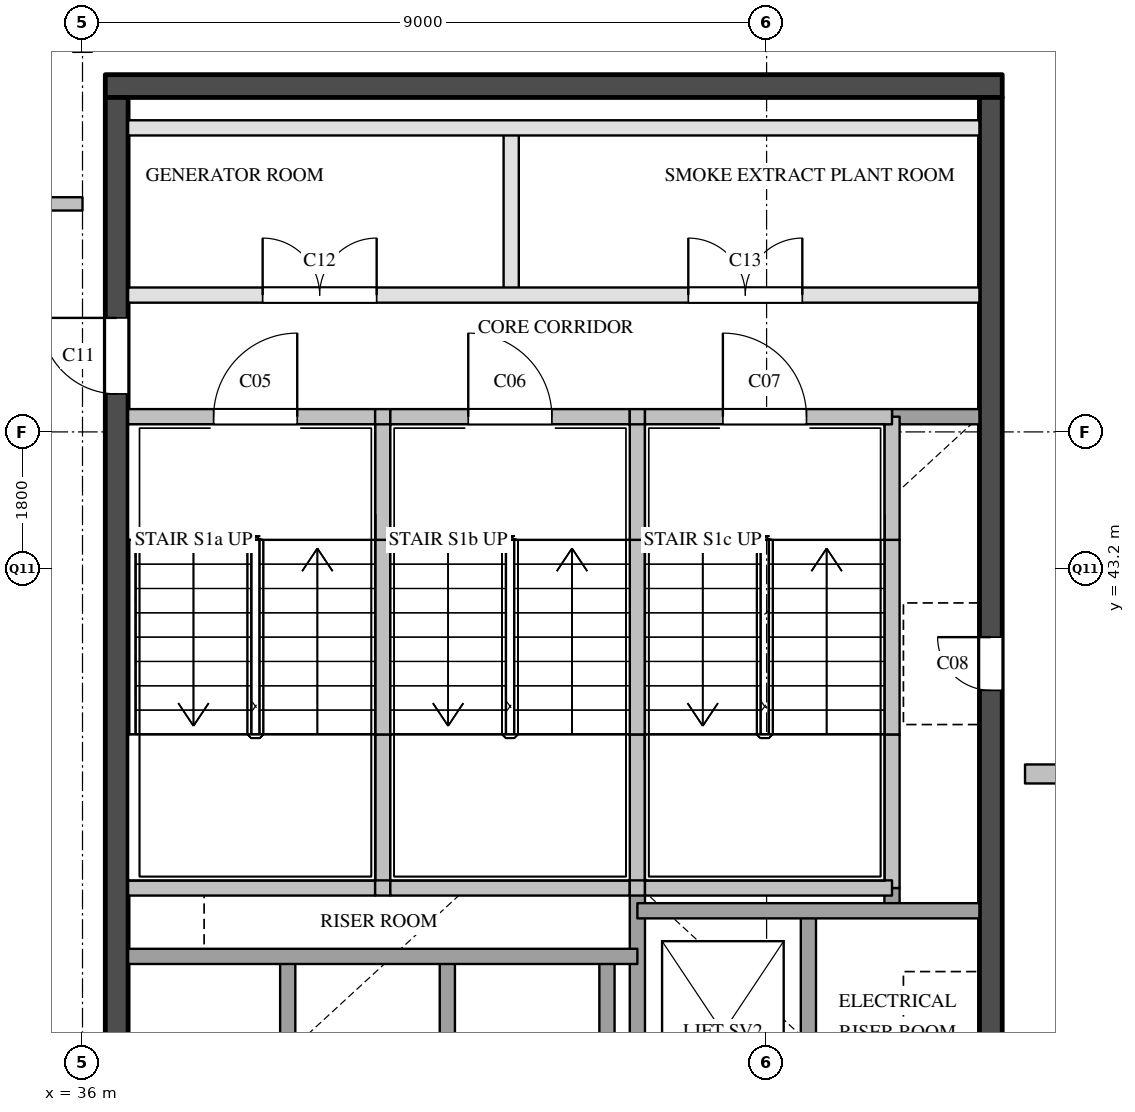
"""IFC4 building model, lengths in metres.
Left out: names, types, materials, properties, quantities, classifications, styles, units other than length and angle.
Written with IfcOpenShell. Run it as: python <this file> out.ifc"""

import sys

from ifc_helpers import new_model, si_unit, direction, frame, frame_2d, origin, place, context, subcontext, project, spatial, rectangle, extrude, element, fill, save


model = new_model("IFC4")
c1 = context("Model", 3, precision=1e-05, world=origin(), true_north=direction((0.0, 1.0)))
c2 = subcontext(c1, "Body", "Model", "MODEL_VIEW")
j1 = project(units=[si_unit("LENGTHUNIT", "METRE"), si_unit("PLANEANGLEUNIT", "RADIAN")], contexts=[c1])
p1 = place(None, origin())
s1 = spatial("IfcSite", under=j1, at=p1, CompositionType="ELEMENT")
p2 = place(p1, origin())
s2 = spatial("IfcBuilding", under=s1, at=p2, CompositionType="ELEMENT")
p3 = place(p2, frame((0.0, 0.0, 295.2)))
s3 = spatial("IfcBuildingStorey", under=s2, at=p3, CompositionType="ELEMENT", Elevation=295.2)
p4 = place(p3, frame((36.3, 49.55, 0.0), z_axis=(0.0, 0.0, 1.0), x_axis=(1.0, 0.0, 0.0)))
e1 = element("IfcWall", 1, at=p4, inside=s3, PredefinedType="SHEAR", context=c2, shape_type="SweptSolid", body=[
    extrude(rectangle(XDim=11.8, YDim=0.3, at=frame_2d((5.9, 0.0))), origin(), (0.0, 0.0, 1.0), 5.7),
])
p5 = place(p3, frame((36.45, 29.1, 0.0), z_axis=(0.0, 0.0, 1.0), x_axis=(0.0, 1.0, 0.0)))
e2 = element("IfcWall", 2, at=p5, inside=s3, PredefinedType="SHEAR", context=c2, shape_type="SweptSolid", body=[
    extrude(rectangle(XDim=20.3, YDim=0.3, at=frame_2d((10.15, 0.0))), origin(), (0.0, 0.0, 1.0), 5.7),
])
p6 = place(p5, frame((3.6, 0.0, 0.0)))
e3 = element("IfcOpeningElement", 3, at=p6, cuts=e2, PredefinedType="OPENING", context=c2, shape_type="SweptSolid", body=[
    extrude(rectangle(XDim=1.8, YDim=2.1, at=frame_2d((0.9, 1.05))), frame((0.0, 0.16, 0.0), z_axis=(0.0, -1.0, 0.0), x_axis=(1.0, 0.0, 0.0)), (0.0, 0.0, 1.0), 0.32),
])
p7 = place(p5, frame((16.4, 0.0, 0.0)))
e4 = element("IfcOpeningElement", 4, at=p7, cuts=e2, PredefinedType="OPENING", context=c2, shape_type="SweptSolid", body=[
    extrude(rectangle(XDim=1.0, YDim=2.1, at=frame_2d((0.5, 1.05))), frame((0.0, 0.16, 0.0), z_axis=(0.0, -1.0, 0.0), x_axis=(1.0, 0.0, 0.0)), (0.0, 0.0, 1.0), 0.32),
])
p8 = place(p3, frame((47.95, 29.1, 0.0), z_axis=(0.0, 0.0, 1.0), x_axis=(0.0, 1.0, 0.0)))
e5 = element("IfcWall", 5, at=p8, inside=s3, PredefinedType="SHEAR", context=c2, shape_type="SweptSolid", body=[
    extrude(rectangle(XDim=20.3, YDim=0.3, at=frame_2d((10.15, 0.0))), origin(), (0.0, 0.0, 1.0), 5.7),
])
p9 = place(p8, frame((12.5, 0.0, 0.0)))
e6 = element("IfcOpeningElement", 6, at=p9, cuts=e5, PredefinedType="OPENING", context=c2, shape_type="SweptSolid", body=[
    extrude(rectangle(XDim=0.7, YDim=2.1, at=frame_2d((0.35, 1.05))), frame((0.0, 0.16, 0.0), z_axis=(0.0, -1.0, 0.0), x_axis=(1.0, 0.0, 0.0)), (0.0, 0.0, 1.0), 0.32),
])
p10 = place(p3, frame((38.7, 34.9, 0.0), z_axis=(0.0, 0.0, 1.0), x_axis=(0.0, 1.0, 0.0)))
e7 = element("IfcWall", 7, at=p10, inside=s3, PredefinedType="SOLIDWALL", context=c2, shape_type="SweptSolid", body=[
    extrude(rectangle(XDim=3.2, YDim=0.2, at=frame_2d((1.6, 0.0))), origin(), (0.0, 0.0, 1.0), 5.7),
])
p11 = place(p3, frame((39.95, 39.0, 0.0), z_axis=(0.0, 0.0, 1.0), x_axis=(0.0, 1.0, 0.0)))
e8 = element("IfcWall", 8, at=p11, inside=s3, PredefinedType="SOLIDWALL", context=c2, shape_type="SweptSolid", body=[
    extrude(rectangle(XDim=2.02, YDim=0.2, at=frame_2d((1.01, 0.0))), origin(), (0.0, 0.0, 1.0), 5.7),
])
p12 = place(p3, frame((39.95, 41.02, 0.0), z_axis=(0.0, 0.0, 1.0), x_axis=(0.0, 1.0, 0.0)))
e9 = element("IfcWall", 9, at=p12, inside=s3, PredefinedType="SOLIDWALL", context=c2, shape_type="SweptSolid", body=[
    extrude(rectangle(XDim=2.56, YDim=0.2, at=frame_2d((1.28, 0.0))), origin(), (0.0, 0.0, 1.0), 5.7),
])
p13 = place(p3, frame((39.95, 43.58, 0.0), z_axis=(0.0, 0.0, 1.0), x_axis=(0.0, 1.0, 0.0)))
e10 = element("IfcWall", 10, at=p13, inside=s3, PredefinedType="SOLIDWALL", context=c2, shape_type="SweptSolid", body=[
    extrude(rectangle(XDim=1.62, YDim=0.2, at=frame_2d((0.81, 0.0))), origin(), (0.0, 0.0, 1.0), 5.7),
])
p14 = place(p3, frame((40.8, 34.9, 0.0), z_axis=(0.0, 0.0, 1.0), x_axis=(0.0, 1.0, 0.0)))
e11 = element("IfcWall", 11, at=p14, inside=s3, PredefinedType="SOLIDWALL", context=c2, shape_type="SweptSolid", body=[
    extrude(rectangle(XDim=3.2, YDim=0.2, at=frame_2d((1.6, 0.0))), origin(), (0.0, 0.0, 1.0), 5.7),
])
p15 = place(p3, frame((41.64, 46.8, 0.0), z_axis=(0.0, 0.0, 1.0), x_axis=(0.0, 1.0, 0.0)))
e12 = element("IfcWall", 12, at=p15, inside=s3, PredefinedType="PARTITIONING", context=c2, shape_type="SweptSolid", body=[
    extrude(rectangle(XDim=2.2, YDim=0.2, at=frame_2d((1.1, 0.0))), origin(), (0.0, 0.0, 1.0), 5.7),
])
p16 = place(p3, frame((42.9, 34.9, 0.0), z_axis=(0.0, 0.0, 1.0), x_axis=(0.0, 1.0, 0.0)))
e13 = element("IfcWall", 13, at=p16, inside=s3, PredefinedType="SOLIDWALL", context=c2, shape_type="SweptSolid", body=[
    extrude(rectangle(XDim=3.2, YDim=0.2, at=frame_2d((1.6, 0.0))), origin(), (0.0, 0.0, 1.0), 5.7),
])
p17 = place(p3, frame((43.3, 29.1, 0.0), z_axis=(0.0, 0.0, 1.0), x_axis=(0.0, 1.0, 0.0)))
e14 = element("IfcWall", 14, at=p17, inside=s3, PredefinedType="SOLIDWALL", context=c2, shape_type="SweptSolid", body=[
    extrude(rectangle(XDim=9.9, YDim=0.2, at=frame_2d((4.95, 0.0))), origin(), (0.0, 0.0, 1.0), 5.7),
])
p18 = place(p17, frame((3.6, 0.0, 0.0)))
e15 = element("IfcOpeningElement", 15, at=p18, cuts=e14, PredefinedType="OPENING", context=c2, shape_type="SweptSolid", body=[
    extrude(rectangle(XDim=1.8, YDim=2.1, at=frame_2d((0.9, 1.05))), frame((0.0, 0.11, 0.0), z_axis=(0.0, -1.0, 0.0), x_axis=(1.0, 0.0, 0.0)), (0.0, 0.0, 1.0), 0.22),
])
p19 = place(p3, frame((43.3, 39.0, 0.0), z_axis=(0.0, 0.0, 1.0), x_axis=(0.0, 1.0, 0.0)))
e16 = element("IfcWall", 16, at=p19, inside=s3, PredefinedType="SOLIDWALL", context=c2, shape_type="SweptSolid", body=[
    extrude(rectangle(XDim=2.02, YDim=0.2, at=frame_2d((1.01, 0.0))), origin(), (0.0, 0.0, 1.0), 5.7),
])
p20 = place(p3, frame((43.3, 41.02, 0.0), z_axis=(0.0, 0.0, 1.0), x_axis=(0.0, 1.0, 0.0)))
e17 = element("IfcWall", 17, at=p20, inside=s3, PredefinedType="SOLIDWALL", context=c2, shape_type="SweptSolid", body=[
    extrude(rectangle(XDim=2.56, YDim=0.2, at=frame_2d((1.28, 0.0))), origin(), (0.0, 0.0, 1.0), 5.7),
])
p21 = place(p3, frame((43.3, 43.58, 0.0), z_axis=(0.0, 0.0, 1.0), x_axis=(0.0, 1.0, 0.0)))
e18 = element("IfcWall", 18, at=p21, inside=s3, PredefinedType="SOLIDWALL", context=c2, shape_type="SweptSolid", body=[
    extrude(rectangle(XDim=1.62, YDim=0.2, at=frame_2d((0.81, 0.0))), origin(), (0.0, 0.0, 1.0), 5.7),
])
p22 = place(p3, frame((45.55, 35.5, 0.0), z_axis=(0.0, 0.0, 1.0), x_axis=(0.0, 1.0, 0.0)))
e19 = element("IfcWall", 19, at=p22, inside=s3, PredefinedType="SOLIDWALL", context=c2, shape_type="SweptSolid", body=[
    extrude(rectangle(XDim=3.2, YDim=0.2, at=frame_2d((1.6, 0.0))), origin(), (0.0, 0.0, 1.0), 5.7),
])
p23 = place(p3, frame((46.65, 38.7, 0.0), z_axis=(0.0, 0.0, 1.0), x_axis=(0.0, 1.0, 0.0)))
e20 = element("IfcWall", 20, at=p23, inside=s3, PredefinedType="SOLIDWALL", context=c2, shape_type="SweptSolid", body=[
    extrude(rectangle(XDim=0.3, YDim=0.2, at=frame_2d((0.15, 0.0))), origin(), (0.0, 0.0, 1.0), 5.7),
])
p24 = place(p3, frame((46.65, 39.0, 0.0), z_axis=(0.0, 0.0, 1.0), x_axis=(0.0, 1.0, 0.0)))
e21 = element("IfcWall", 21, at=p24, inside=s3, PredefinedType="SOLIDWALL", context=c2, shape_type="SweptSolid", body=[
    extrude(rectangle(XDim=2.02, YDim=0.2, at=frame_2d((1.01, 0.0))), origin(), (0.0, 0.0, 1.0), 5.7),
])
p25 = place(p3, frame((46.65, 41.02, 0.0), z_axis=(0.0, 0.0, 1.0), x_axis=(0.0, 1.0, 0.0)))
e22 = element("IfcWall", 22, at=p25, inside=s3, PredefinedType="SOLIDWALL", context=c2, shape_type="SweptSolid", body=[
    extrude(rectangle(XDim=2.56, YDim=0.2, at=frame_2d((1.28, 0.0))), origin(), (0.0, 0.0, 1.0), 5.7),
])
p26 = place(p3, frame((46.65, 43.58, 0.0), z_axis=(0.0, 0.0, 1.0), x_axis=(0.0, 1.0, 0.0)))
e23 = element("IfcWall", 23, at=p26, inside=s3, PredefinedType="SOLIDWALL", context=c2, shape_type="SweptSolid", body=[
    extrude(rectangle(XDim=1.62, YDim=0.2, at=frame_2d((0.81, 0.0))), origin(), (0.0, 0.0, 1.0), 5.7),
])
p27 = place(p3, frame((36.6, 38.1, 0.0), z_axis=(0.0, 0.0, 1.0), x_axis=(1.0, 0.0, 0.0)))
e24 = element("IfcWall", 24, at=p27, inside=s3, PredefinedType="SOLIDWALL", context=c2, shape_type="SweptSolid", body=[
    extrude(rectangle(XDim=6.7, YDim=0.2, at=frame_2d((3.35, 0.0))), origin(), (0.0, 0.0, 1.0), 5.7),
])
p28 = place(p3, frame((43.3, 38.7, 0.0), z_axis=(0.0, 0.0, 1.0), x_axis=(1.0, 0.0, 0.0)))
e25 = element("IfcWall", 25, at=p28, inside=s3, PredefinedType="SOLIDWALL", context=c2, shape_type="SweptSolid", body=[
    extrude(rectangle(XDim=4.5, YDim=0.2, at=frame_2d((2.25, 0.0))), origin(), (0.0, 0.0, 1.0), 5.7),
])
p29 = place(p3, frame((36.6, 39.0, 0.0), z_axis=(0.0, 0.0, 1.0), x_axis=(1.0, 0.0, 0.0)))
e26 = element("IfcWall", 26, at=p29, inside=s3, PredefinedType="SOLIDWALL", context=c2, shape_type="SweptSolid", body=[
    extrude(rectangle(XDim=3.25, YDim=0.2, at=frame_2d((1.625, 0.0))), origin(), (0.0, 0.0, 1.0), 5.7),
])
p30 = place(p3, frame((39.85, 39.0, 0.0), z_axis=(0.0, 0.0, 1.0), x_axis=(1.0, 0.0, 0.0)))
e27 = element("IfcWall", 27, at=p30, inside=s3, PredefinedType="SOLIDWALL", context=c2, shape_type="SweptSolid", body=[
    extrude(rectangle(XDim=0.2, YDim=0.2, at=frame_2d((0.1, 0.0))), origin(), (0.0, 0.0, 1.0), 5.7),
])
p31 = place(p3, frame((40.05, 39.0, 0.0), z_axis=(0.0, 0.0, 1.0), x_axis=(1.0, 0.0, 0.0)))
e28 = element("IfcWall", 28, at=p31, inside=s3, PredefinedType="SOLIDWALL", context=c2, shape_type="SweptSolid", body=[
    extrude(rectangle(XDim=3.15, YDim=0.2, at=frame_2d((1.575, 0.0))), origin(), (0.0, 0.0, 1.0), 5.7),
])
p32 = place(p3, frame((43.2, 39.0, 0.0), z_axis=(0.0, 0.0, 1.0), x_axis=(1.0, 0.0, 0.0)))
e29 = element("IfcWall", 29, at=p32, inside=s3, PredefinedType="SOLIDWALL", context=c2, shape_type="SweptSolid", body=[
    extrude(rectangle(XDim=0.2, YDim=0.2, at=frame_2d((0.1, 0.0))), origin(), (0.0, 0.0, 1.0), 5.7),
])
p33 = place(p3, frame((43.4, 39.0, 0.0), z_axis=(0.0, 0.0, 1.0), x_axis=(1.0, 0.0, 0.0)))
e30 = element("IfcWall", 30, at=p33, inside=s3, PredefinedType="SOLIDWALL", context=c2, shape_type="SweptSolid", body=[
    extrude(rectangle(XDim=3.25, YDim=0.2, at=frame_2d((1.625, 0.0))), origin(), (0.0, 0.0, 1.0), 5.7),
])
p34 = place(p3, frame((46.65, 45.2, 0.0), z_axis=(0.0, 0.0, 1.0), x_axis=(1.0, 0.0, 0.0)))
e31 = element("IfcWall", 31, at=p34, inside=s3, PredefinedType="SOLIDWALL", context=c2, shape_type="SweptSolid", body=[
    extrude(rectangle(XDim=1.15, YDim=0.2, at=frame_2d((0.575, 0.0))), origin(), (0.0, 0.0, 1.0), 5.7),
])
p35 = place(p3, frame((36.6, 45.2, 0.0), z_axis=(0.0, 0.0, 1.0), x_axis=(1.0, 0.0, 0.0)))
e32 = element("IfcWall", 32, at=p35, inside=s3, PredefinedType="SOLIDWALL", context=c2, shape_type="SweptSolid", body=[
    extrude(rectangle(XDim=3.25, YDim=0.2, at=frame_2d((1.625, 0.0))), origin(), (0.0, 0.0, 1.0), 5.7),
])
p36 = place(p35, frame((1.125, 0.0, 0.0)))
e33 = element("IfcOpeningElement", 33, at=p36, cuts=e32, PredefinedType="OPENING", context=c2, shape_type="SweptSolid", body=[
    extrude(rectangle(XDim=1.1, YDim=2.1, at=frame_2d((0.55, 1.05))), frame((0.0, 0.11, 0.0), z_axis=(0.0, -1.0, 0.0), x_axis=(1.0, 0.0, 0.0)), (0.0, 0.0, 1.0), 0.22),
])
p37 = place(p3, frame((39.85, 45.2, 0.0), z_axis=(0.0, 0.0, 1.0), x_axis=(1.0, 0.0, 0.0)))
e34 = element("IfcWall", 34, at=p37, inside=s3, PredefinedType="SOLIDWALL", context=c2, shape_type="SweptSolid", body=[
    extrude(rectangle(XDim=0.2, YDim=0.2, at=frame_2d((0.1, 0.0))), origin(), (0.0, 0.0, 1.0), 5.7),
])
p38 = place(p3, frame((40.05, 45.2, 0.0), z_axis=(0.0, 0.0, 1.0), x_axis=(1.0, 0.0, 0.0)))
e35 = element("IfcWall", 35, at=p38, inside=s3, PredefinedType="SOLIDWALL", context=c2, shape_type="SweptSolid", body=[
    extrude(rectangle(XDim=3.15, YDim=0.2, at=frame_2d((1.575, 0.0))), origin(), (0.0, 0.0, 1.0), 5.7),
])
p39 = place(p38, frame((1.025, 0.0, 0.0)))
e36 = element("IfcOpeningElement", 36, at=p39, cuts=e35, PredefinedType="OPENING", context=c2, shape_type="SweptSolid", body=[
    extrude(rectangle(XDim=1.1, YDim=2.1, at=frame_2d((0.55, 1.05))), frame((0.0, 0.11, 0.0), z_axis=(0.0, -1.0, 0.0), x_axis=(1.0, 0.0, 0.0)), (0.0, 0.0, 1.0), 0.22),
])
p40 = place(p3, frame((43.2, 45.2, 0.0), z_axis=(0.0, 0.0, 1.0), x_axis=(1.0, 0.0, 0.0)))
e37 = element("IfcWall", 37, at=p40, inside=s3, PredefinedType="SOLIDWALL", context=c2, shape_type="SweptSolid", body=[
    extrude(rectangle(XDim=0.2, YDim=0.2, at=frame_2d((0.1, 0.0))), origin(), (0.0, 0.0, 1.0), 5.7),
])
p41 = place(p3, frame((43.4, 45.2, 0.0), z_axis=(0.0, 0.0, 1.0), x_axis=(1.0, 0.0, 0.0)))
e38 = element("IfcWall", 38, at=p41, inside=s3, PredefinedType="SOLIDWALL", context=c2, shape_type="SweptSolid", body=[
    extrude(rectangle(XDim=3.25, YDim=0.2, at=frame_2d((1.625, 0.0))), origin(), (0.0, 0.0, 1.0), 5.7),
])
p42 = place(p41, frame((1.025, 0.0, 0.0)))
e39 = element("IfcOpeningElement", 39, at=p42, cuts=e38, PredefinedType="OPENING", context=c2, shape_type="SweptSolid", body=[
    extrude(rectangle(XDim=1.1, YDim=2.1, at=frame_2d((0.55, 1.05))), frame((0.0, 0.11, 0.0), z_axis=(0.0, -1.0, 0.0), x_axis=(1.0, 0.0, 0.0)), (0.0, 0.0, 1.0), 0.22),
])
p43 = place(p3, frame((36.6, 46.8, 0.0), z_axis=(0.0, 0.0, 1.0), x_axis=(1.0, 0.0, 0.0)))
e40 = element("IfcWall", 40, at=p43, inside=s3, PredefinedType="PARTITIONING", context=c2, shape_type="SweptSolid", body=[
    extrude(rectangle(XDim=11.2, YDim=0.2, at=frame_2d((5.6, 0.0))), origin(), (0.0, 0.0, 1.0), 5.7),
])
p44 = place(p43, frame((1.77, 0.0, 0.0)))
e41 = element("IfcOpeningElement", 41, at=p44, cuts=e40, PredefinedType="OPENING", context=c2, shape_type="SweptSolid", body=[
    extrude(rectangle(XDim=1.5, YDim=2.1, at=frame_2d((0.75, 1.05))), frame((0.0, 0.11, 0.0), z_axis=(0.0, -1.0, 0.0), x_axis=(1.0, 0.0, 0.0)), (0.0, 0.0, 1.0), 0.22),
])
p45 = place(p43, frame((7.37, 0.0, 0.0)))
e42 = element("IfcOpeningElement", 42, at=p45, cuts=e40, PredefinedType="OPENING", context=c2, shape_type="SweptSolid", body=[
    extrude(rectangle(XDim=1.5, YDim=2.1, at=frame_2d((0.75, 1.05))), frame((0.0, 0.11, 0.0), z_axis=(0.0, -1.0, 0.0), x_axis=(1.0, 0.0, 0.0)), (0.0, 0.0, 1.0), 0.22),
])
p46 = place(p3, frame((36.6, 49.0, 0.0), z_axis=(0.0, 0.0, 1.0), x_axis=(1.0, 0.0, 0.0)))
e43 = element("IfcWall", 43, at=p46, inside=s3, PredefinedType="PARTITIONING", context=c2, shape_type="SweptSolid", body=[
    extrude(rectangle(XDim=11.2, YDim=0.2, at=frame_2d((5.6, 0.0))), origin(), (0.0, 0.0, 1.0), 5.7),
])
p47 = place(p3, frame((24.0, 48.0, 0.0), z_axis=(0.0, 0.0, 1.0), x_axis=(1.0, 0.0, 0.0)))
e44 = element("IfcWall", 44, at=p47, inside=s3, PredefinedType="PARTITIONING", context=c2, shape_type="SweptSolid", body=[
    extrude(rectangle(XDim=12.0, YDim=0.175, at=frame_2d((6.0, 0.0))), origin(), (0.0, 0.0, 1.0), 5.7),
])
p48 = place(p47, frame((5.5, 0.0, 0.0)))
e45 = element("IfcOpeningElement", 45, at=p48, cuts=e44, PredefinedType="OPENING", context=c2, shape_type="SweptSolid", body=[
    extrude(rectangle(XDim=1.0, YDim=2.1, at=frame_2d((0.5, 1.05))), frame((0.0, 0.097, 0.0), z_axis=(0.0, -1.0, 0.0), x_axis=(1.0, 0.0, 0.0)), (0.0, 0.0, 1.0), 0.195),
])
p49 = place(p3, frame((48.4, 40.5, 0.0), z_axis=(0.0, 0.0, 1.0), x_axis=(1.0, 0.0, 0.0)))
e46 = element("IfcWall", 46, at=p49, inside=s3, PredefinedType="PARTITIONING", context=c2, shape_type="SweptSolid", body=[
    extrude(rectangle(XDim=5.6, YDim=0.25, at=frame_2d((2.8, 0.0))), origin(), (0.0, 0.0, 1.0), 5.7),
])
p50 = place(p49, frame((2.3, 0.0, 0.0)))
e47 = element("IfcOpeningElement", 47, at=p50, cuts=e46, PredefinedType="OPENING", context=c2, shape_type="SweptSolid", body=[
    extrude(rectangle(XDim=1.0, YDim=2.1, at=frame_2d((0.5, 1.05))), frame((0.0, 0.135, 0.0), z_axis=(0.0, -1.0, 0.0), x_axis=(1.0, 0.0, 0.0)), (0.0, 0.0, 1.0), 0.27),
])
p51 = place(p36, origin())
e48 = element("IfcDoor", 48, at=p51, inside=s3, OperationType="SINGLE_SWING_RIGHT", PredefinedType="DOOR", context=c2, shape_type="SweptSolid", body=[
    extrude(rectangle(XDim=1.1, YDim=2.1, at=frame_2d((0.55, 1.05))), frame((0.0, 0.025, 0.0), z_axis=(0.0, -1.0, 0.0), x_axis=(1.0, 0.0, 0.0)), (0.0, 0.0, 1.0), 0.05),
])
fill(e33, e48)
p52 = place(p39, origin())
e49 = element("IfcDoor", 49, at=p52, inside=s3, OperationType="SINGLE_SWING_LEFT", PredefinedType="DOOR", context=c2, shape_type="SweptSolid", body=[
    extrude(rectangle(XDim=1.1, YDim=2.1, at=frame_2d((0.55, 1.05))), frame((0.0, 0.025, 0.0), z_axis=(0.0, -1.0, 0.0), x_axis=(1.0, 0.0, 0.0)), (0.0, 0.0, 1.0), 0.05),
])
fill(e36, e49)
p53 = place(p42, origin())
e50 = element("IfcDoor", 50, at=p53, inside=s3, OperationType="SINGLE_SWING_LEFT", PredefinedType="DOOR", context=c2, shape_type="SweptSolid", body=[
    extrude(rectangle(XDim=1.1, YDim=2.1, at=frame_2d((0.55, 1.05))), frame((0.0, 0.025, 0.0), z_axis=(0.0, -1.0, 0.0), x_axis=(1.0, 0.0, 0.0)), (0.0, 0.0, 1.0), 0.05),
])
fill(e39, e50)
p54 = place(p9, origin())
e51 = element("IfcDoor", 51, at=p54, inside=s3, OperationType="SINGLE_SWING_RIGHT", PredefinedType="DOOR", context=c2, shape_type="SweptSolid", body=[
    extrude(rectangle(XDim=0.7, YDim=2.1, at=frame_2d((0.35, 1.05))), frame((0.0, 0.025, 0.0), z_axis=(0.0, -1.0, 0.0), x_axis=(1.0, 0.0, 0.0)), (0.0, 0.0, 1.0), 0.05),
])
fill(e6, e51)
p55 = place(p7, origin())
e52 = element("IfcDoor", 52, at=p55, inside=s3, OperationType="SINGLE_SWING_RIGHT", PredefinedType="DOOR", context=c2, shape_type="SweptSolid", body=[
    extrude(rectangle(XDim=1.0, YDim=2.1, at=frame_2d((0.5, 1.05))), frame((0.0, 0.025, 0.0), z_axis=(0.0, -1.0, 0.0), x_axis=(1.0, 0.0, 0.0)), (0.0, 0.0, 1.0), 0.05),
])
fill(e4, e52)
p56 = place(p44, origin())
e53 = element("IfcDoor", 53, at=p56, inside=s3, OperationType="DOUBLE_DOOR_SINGLE_SWING", PredefinedType="DOOR", context=c2, shape_type="SweptSolid", body=[
    extrude(rectangle(XDim=1.5, YDim=2.1, at=frame_2d((0.75, 1.05))), frame((0.0, 0.025, 0.0), z_axis=(0.0, -1.0, 0.0), x_axis=(1.0, 0.0, 0.0)), (0.0, 0.0, 1.0), 0.05),
])
fill(e41, e53)
p57 = place(p45, origin())
e54 = element("IfcDoor", 54, at=p57, inside=s3, OperationType="DOUBLE_DOOR_SINGLE_SWING", PredefinedType="DOOR", context=c2, shape_type="SweptSolid", body=[
    extrude(rectangle(XDim=1.5, YDim=2.1, at=frame_2d((0.75, 1.05))), frame((0.0, 0.025, 0.0), z_axis=(0.0, -1.0, 0.0), x_axis=(1.0, 0.0, 0.0)), (0.0, 0.0, 1.0), 0.05),
])
fill(e42, e54)
save(model, sys.argv[1])
